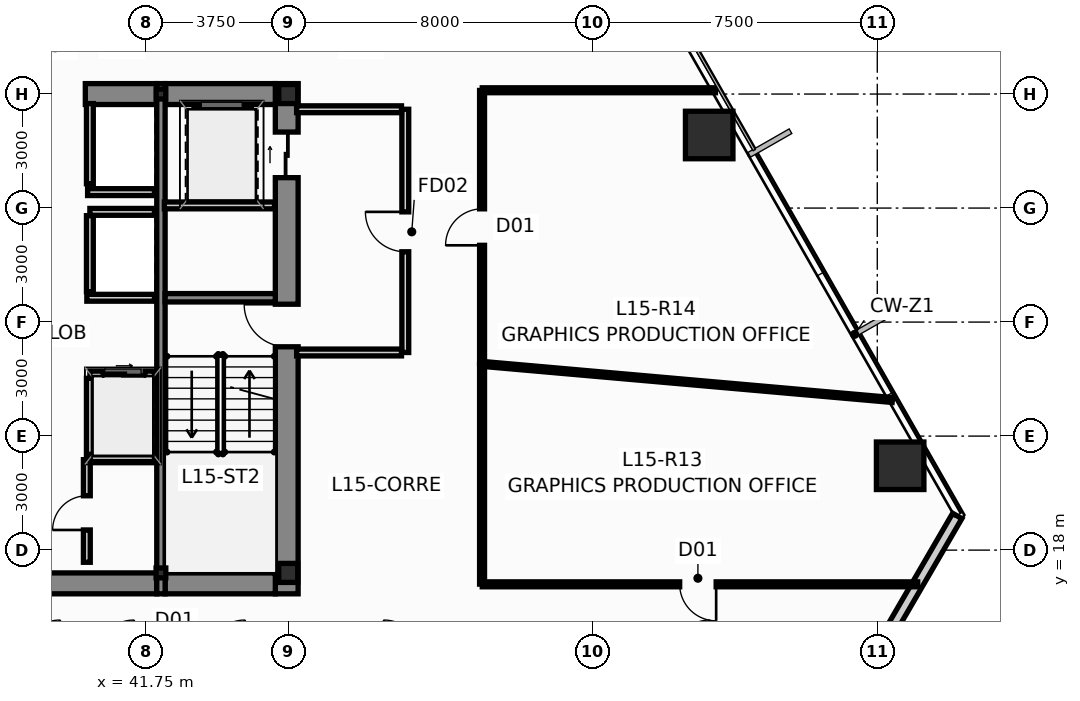
"""IFC4 building model, lengths in metres.
Left out: names, types, materials, properties, quantities, classifications, styles, units other than length and angle.
Written with IfcOpenShell. Run it as: python <this file> out.ifc"""

import sys

from ifc_helpers import new_model, si_unit, direction, frame, frame_2d, origin, origin_2d, place, context, subcontext, project, spatial, rectangle, hollow_rectangle, i_section, extrude, source, transform, mapped, element, fill, save


model = new_model("IFC4")
c1 = context("Model", 3, precision=1e-05, world=origin(), true_north=direction((0.0, 1.0)))
c2 = subcontext(c1, "Body", "Model", "MODEL_VIEW")
j1 = project(units=[si_unit("LENGTHUNIT", "METRE"), si_unit("PLANEANGLEUNIT", "RADIAN")], contexts=[c1])
p1 = place(None, origin())
s1 = spatial("IfcSite", under=j1, at=p1, CompositionType="ELEMENT")
p2 = place(p1, origin())
s2 = spatial("IfcBuilding", under=s1, at=p2, CompositionType="ELEMENT")
p3 = place(p2, frame((0.0, 0.0, 60.45)))
s3 = spatial("IfcBuildingStorey", under=s2, at=p3, CompositionType="ELEMENT", Elevation=60.45)
m1 = source(origin(), c2, "Body", "SweptSolid", [
    extrude(i_section(OverallWidth=0.5, OverallDepth=0.5, WebThickness=0.028, FlangeThickness=0.04, at=origin_2d()), origin(), (0.0, 0.0, 1.0), 3.65),
])
for number, where, z_axis, x_axis in (
    (1, (45.5, 17.4, 0.0), (0.0, 0.0, 1.0), (1.0, 0.0, 0.0)),
    (2, (45.5, 30.0, 0.0), (0.0, 0.0, 1.0), (1.0, 0.0, 0.0)),
):
    element("IfcColumn", number, at=place(p3, frame(where, z_axis=z_axis, x_axis=x_axis)), inside=s3, PredefinedType="COLUMN", context=c2, shape_type="MappedRepresentation", body=[
        mapped(m1, transform((0.0, 0.0, 0.0), scale=1.0)),
    ])
m2 = source(origin(), c2, "Body", "SweptSolid", [
    extrude(i_section(OverallWidth=0.256, OverallDepth=0.26, WebThickness=0.01, FlangeThickness=0.017, at=origin_2d()), origin(), (0.0, 0.0, 1.0), 3.65),
])
for number, where, z_axis, x_axis in (
    (3, (42.15, 17.4, 0.0), (0.0, 0.0, 1.0), (1.0, 0.0, 0.0)),
    (4, (42.15, 30.0, 0.0), (0.0, 0.0, 1.0), (1.0, 0.0, 0.0)),
):
    element("IfcColumn", number, at=place(p3, frame(where, z_axis=z_axis, x_axis=x_axis)), inside=s3, PredefinedType="COLUMN", context=c2, shape_type="MappedRepresentation", body=[
        mapped(m2, transform((0.0, 0.0, 0.0), scale=1.0)),
    ])
p4 = place(p3, frame((45.46, 16.85, 0.0), z_axis=(0.0, 0.0, 1.0), x_axis=(0.0, 1.0, 0.0)))
e5 = element("IfcWall", 5, at=p4, inside=s3, PredefinedType="SHEAR", context=c2, shape_type="SweptSolid", body=[
    extrude(rectangle(XDim=13.425, YDim=0.6, at=frame_2d((6.712, 0.0))), origin(), (0.0, 0.0, 1.0), 3.65),
])
p5 = place(p4, frame((6.5, 0.0, 0.0)))
e6 = element("IfcOpeningElement", 6, at=p5, cuts=e5, PredefinedType="OPENING", context=c2, shape_type="SweptSolid", body=[
    extrude(rectangle(XDim=1.12, YDim=2.15, at=frame_2d((0.56, 1.075))), frame((0.0, 0.312, 0.0), z_axis=(0.0, -1.0, 0.0), x_axis=(1.0, 0.0, 0.0)), (0.0, 0.0, 1.0), 0.624),
])
p6 = place(p4, frame((10.95, 0.0, 0.0)))
e7 = element("IfcOpeningElement", 7, at=p6, cuts=e5, PredefinedType="OPENING", context=c2, shape_type="SweptSolid", body=[
    extrude(rectangle(XDim=1.2, YDim=2.2, at=frame_2d((0.6, 1.1))), frame((0.0, 0.312, 0.0), z_axis=(0.0, -1.0, 0.0), x_axis=(1.0, 0.0, 0.0)), (0.0, 0.0, 1.0), 0.624),
])
p7 = place(p3, frame((33.96, 17.125, 0.0), z_axis=(0.0, 0.0, 1.0), x_axis=(1.0, 0.0, 0.0)))
e8 = element("IfcWall", 8, at=p7, inside=s3, PredefinedType="SHEAR", context=c2, shape_type="SweptSolid", body=[
    extrude(rectangle(XDim=8.08, YDim=0.55, at=frame_2d((4.04, 0.0))), origin(), (0.0, 0.0, 1.0), 3.65),
])
p8 = place(p3, frame((42.26, 17.125, 0.0), z_axis=(0.0, 0.0, 1.0), x_axis=(1.0, 0.0, 0.0)))
e9 = element("IfcWall", 9, at=p8, inside=s3, PredefinedType="SHEAR", context=c2, shape_type="SweptSolid", body=[
    extrude(rectangle(XDim=2.9, YDim=0.55, at=frame_2d((1.45, 0.0))), origin(), (0.0, 0.0, 1.0), 3.65),
])
p9 = place(p3, frame((40.16, 30.0, 0.0), z_axis=(0.0, 0.0, 1.0), x_axis=(1.0, 0.0, 0.0)))
e10 = element("IfcWall", 10, at=p9, inside=s3, PredefinedType="SHEAR", context=c2, shape_type="SweptSolid", body=[
    extrude(rectangle(XDim=1.88, YDim=0.55, at=frame_2d((0.94, 0.0))), origin(), (0.0, 0.0, 1.0), 3.65),
])
p10 = place(p3, frame((42.26, 30.0, 0.0), z_axis=(0.0, 0.0, 1.0), x_axis=(1.0, 0.0, 0.0)))
e11 = element("IfcWall", 11, at=p10, inside=s3, PredefinedType="SHEAR", context=c2, shape_type="SweptSolid", body=[
    extrude(rectangle(XDim=2.9, YDim=0.55, at=frame_2d((1.45, 0.0))), origin(), (0.0, 0.0, 1.0), 3.65),
])
p11 = place(p3, frame((42.15, 16.85, 0.0), z_axis=(0.0, 0.0, 1.0), x_axis=(0.0, 1.0, 0.0)))
e12 = element("IfcWall", 12, at=p11, inside=s3, PredefinedType="SHEAR", context=c2, shape_type="SweptSolid", body=[
    extrude(rectangle(XDim=13.425, YDim=0.22, at=frame_2d((6.712, 0.0))), origin(), (0.0, 0.0, 1.0), 3.65),
])
p12 = place(p3, frame((42.26, 24.64, 0.0), z_axis=(0.0, 0.0, 1.0), x_axis=(1.0, 0.0, 0.0)))
e13 = element("IfcWall", 13, at=p12, inside=s3, PredefinedType="SHEAR", context=c2, shape_type="SweptSolid", body=[
    extrude(rectangle(XDim=2.9, YDim=0.22, at=frame_2d((1.45, 0.0))), origin(), (0.0, 0.0, 1.0), 3.65),
])
m3 = source(origin(), c2, "Body", "SweptSolid", [
    extrude(hollow_rectangle(XDim=1.25, YDim=1.25, WallThickness=0.07, at=origin_2d()), origin(), (0.0, 0.0, 1.0), 3.651),
])
p13 = place(p3, frame((61.602, 20.219, 0.0), z_axis=(-0.010364239282, -0.021530871282, 0.999714461297), x_axis=(0.901042175273, -0.433731481886, 0.0)))
e14 = element("IfcColumn", 14, at=p13, inside=s3, PredefinedType="COLUMN", context=c2, shape_type="MappedRepresentation", body=[
    mapped(m3, transform((0.0, 0.0, 0.0), scale=1.0)),
])
m4 = source(origin(), c2, "Body", "SweptSolid", [
    extrude(hollow_rectangle(XDim=1.25, YDim=1.25, WallThickness=0.07, at=origin_2d()), origin(), (0.0, 0.0, 1.0), 3.651),
])
p14 = place(p3, frame((56.577, 28.923, 0.0), z_axis=(-0.014912316331, -0.013775502979, 0.999793907933), x_axis=(0.678553674548, -0.734550822447, 0.0)))
e15 = element("IfcColumn", 15, at=p14, inside=s3, PredefinedType="COLUMN", context=c2, shape_type="MappedRepresentation", body=[
    mapped(m4, transform((0.0, 0.0, 0.0), scale=1.0)),
])
p15 = place(p3, frame((63.104, 18.899, 0.0), z_axis=(0.0, 0.0, 1.0), x_axis=(-0.502893983591, -0.864348101906, 0.0)))
e16 = element("IfcWall", 16, at=p15, inside=s3, PredefinedType="STANDARD", context=c2, shape_type="SweptSolid", body=[
    extrude(rectangle(XDim=16.365, YDim=0.28, at=frame_2d((8.183, 0.0))), origin(), (0.0, 0.0, 1.0), 3.4),
])
p16 = place(p15, frame((7.28, 0.0, 0.9)))
e17 = element("IfcOpeningElement", 17, at=p16, cuts=e16, PredefinedType="OPENING", context=c2, shape_type="SweptSolid", body=[
    extrude(rectangle(XDim=1.8, YDim=1.8, at=frame_2d((0.9, 0.9))), frame((0.0, 0.152, 0.0), z_axis=(0.0, -1.0, 0.0), x_axis=(1.0, 0.0, 0.0)), (0.0, 0.0, 1.0), 0.304),
])
p17 = place(p3, frame((40.28, 22.62, 0.0), z_axis=(0.0, 0.0, 1.0), x_axis=(1.0, 0.0, 0.0)))
e18 = element("IfcWall", 18, at=p17, inside=s3, PredefinedType="PARTITIONING", context=c2, shape_type="SweptSolid", body=[
    extrude(rectangle(XDim=1.7, YDim=0.18, at=frame_2d((0.85, 0.0))), origin(), (0.0, 0.0, 1.0), 3.4),
])
p18 = place(p17, frame((0.35, 0.0, 0.0)))
e19 = element("IfcOpeningElement", 19, at=p18, cuts=e18, PredefinedType="OPENING", context=c2, shape_type="SweptSolid", body=[
    extrude(rectangle(XDim=1.1, YDim=2.2, at=frame_2d((0.55, 1.1))), frame((0.0, 0.102, 0.0), z_axis=(0.0, -1.0, 0.0), x_axis=(1.0, 0.0, 0.0)), (0.0, 0.0, 1.0), 0.204),
])
p19 = place(p3, frame((40.28, 20.52, 0.0), z_axis=(0.0, 0.0, 1.0), x_axis=(0.0, 1.0, 0.0)))
e20 = element("IfcWall", 20, at=p19, inside=s3, PredefinedType="PARTITIONING", context=c2, shape_type="SweptSolid", body=[
    extrude(rectangle(XDim=2.0, YDim=0.18, at=frame_2d((1.0, 0.0))), origin(), (0.0, 0.0, 1.0), 3.4),
])
p20 = place(p3, frame((40.28, 26.9, 0.0), z_axis=(0.0, 0.0, 1.0), x_axis=(1.0, 0.0, 0.0)))
e21 = element("IfcWall", 21, at=p20, inside=s3, PredefinedType="PARTITIONING", context=c2, shape_type="SweptSolid", body=[
    extrude(rectangle(XDim=1.7, YDim=0.18, at=frame_2d((0.85, 0.0))), origin(), (0.0, 0.0, 1.0), 3.4),
])
p21 = place(p3, frame((40.28, 24.8, 0.0), z_axis=(0.0, 0.0, 1.0), x_axis=(0.0, 1.0, 0.0)))
e22 = element("IfcWall", 22, at=p21, inside=s3, PredefinedType="PARTITIONING", context=c2, shape_type="SweptSolid", body=[
    extrude(rectangle(XDim=2.0, YDim=0.18, at=frame_2d((1.0, 0.0))), origin(), (0.0, 0.0, 1.0), 3.4),
])
p22 = place(p3, frame((40.2, 24.64, 0.0), z_axis=(0.0, 0.0, 1.0), x_axis=(1.0, 0.0, 0.0)))
e23 = element("IfcWall", 23, at=p22, inside=s3, PredefinedType="PARTITIONING", context=c2, shape_type="SweptSolid", body=[
    extrude(rectangle(XDim=1.78, YDim=0.18, at=frame_2d((0.89, 0.0))), origin(), (0.0, 0.0, 1.0), 3.4),
])
p23 = place(p3, frame((40.22, 27.42, 0.0), z_axis=(0.0, 0.0, 1.0), x_axis=(1.0, 0.0, 0.0)))
e24 = element("IfcWall", 24, at=p23, inside=s3, PredefinedType="PARTITIONING", context=c2, shape_type="SweptSolid", body=[
    extrude(rectangle(XDim=1.76, YDim=0.18, at=frame_2d((0.88, 0.0))), origin(), (0.0, 0.0, 1.0), 3.4),
])
p24 = place(p3, frame((40.28, 27.64, 0.0), z_axis=(0.0, 0.0, 1.0), x_axis=(0.0, 1.0, 0.0)))
e25 = element("IfcWall", 25, at=p24, inside=s3, PredefinedType="PARTITIONING", context=c2, shape_type="SweptSolid", body=[
    extrude(rectangle(XDim=2.11, YDim=0.18, at=frame_2d((1.055, 0.0))), origin(), (0.0, 0.0, 1.0), 3.4),
])
p25 = place(p3, frame((48.58, 23.2, 0.0), z_axis=(0.0, 0.0, 1.0), x_axis=(0.0, 1.0, 0.0)))
e26 = element("IfcWall", 26, at=p25, inside=s3, PredefinedType="PARTITIONING", context=c2, shape_type="SweptSolid", body=[
    extrude(rectangle(XDim=6.4, YDim=0.18, at=frame_2d((3.2, 0.0))), origin(), (0.0, 0.0, 1.0), 3.026),
])
p26 = place(p25, frame((2.65, 0.0, 0.0)))
e27 = element("IfcOpeningElement", 27, at=p26, cuts=e26, PredefinedType="OPENING", context=c2, shape_type="SweptSolid", body=[
    extrude(rectangle(XDim=1.05, YDim=2.15, at=frame_2d((0.525, 1.075))), frame((0.0, 0.102, 0.0), z_axis=(0.0, -1.0, 0.0), x_axis=(1.0, 0.0, 0.0)), (0.0, 0.0, 1.0), 0.204),
])
p27 = place(p3, frame((45.72, 23.2, 0.0), z_axis=(0.0, 0.0, 1.0), x_axis=(1.0, 0.0, 0.0)))
e28 = element("IfcWall", 28, at=p27, inside=s3, PredefinedType="PARTITIONING", context=c2, shape_type="SweptSolid", body=[
    extrude(rectangle(XDim=2.76, YDim=0.18, at=frame_2d((1.38, 0.0))), origin(), (0.0, 0.0, 1.0), 3.4),
])
p28 = place(p3, frame((45.72, 29.6, 0.0), z_axis=(0.0, 0.0, 1.0), x_axis=(1.0, 0.0, 0.0)))
e29 = element("IfcWall", 29, at=p28, inside=s3, PredefinedType="PARTITIONING", context=c2, shape_type="SweptSolid", body=[
    extrude(rectangle(XDim=2.76, YDim=0.18, at=frame_2d((1.38, 0.0))), origin(), (0.0, 0.0, 1.0), 2.783),
])
p29 = place(p3, frame((42.24, 27.07, 0.0), z_axis=(0.0, 0.0, 1.0), x_axis=(1.0, 0.0, 0.0)))
e30 = element("IfcWall", 30, at=p29, inside=s3, PredefinedType="PARTITIONING", context=c2, shape_type="SweptSolid", body=[
    extrude(rectangle(XDim=2.9, YDim=0.18, at=frame_2d((1.45, 0.0))), origin(), (0.0, 0.0, 1.0), 3.4),
])
p30 = place(p3, frame((40.22, 20.42, 0.0), z_axis=(0.0, 0.0, 1.0), x_axis=(1.0, 0.0, 0.0)))
e31 = element("IfcWall", 31, at=p30, inside=s3, PredefinedType="PARTITIONING", context=c2, shape_type="SweptSolid", body=[
    extrude(rectangle(XDim=1.76, YDim=0.18, at=frame_2d((0.88, 0.0))), origin(), (0.0, 0.0, 1.0), 3.4),
])
p31 = place(p3, frame((40.2, 17.68, 0.0), z_axis=(0.0, 0.0, 1.0), x_axis=(0.0, 1.0, 0.0)))
e32 = element("IfcWall", 32, at=p31, inside=s3, PredefinedType="PARTITIONING", context=c2, shape_type="SweptSolid", body=[
    extrude(rectangle(XDim=2.7, YDim=0.18, at=frame_2d((1.35, 0.0))), origin(), (0.0, 0.0, 1.0), 3.4),
])
p32 = place(p31, frame((0.85, 0.0, 0.0)))
e33 = element("IfcOpeningElement", 33, at=p32, cuts=e32, PredefinedType="OPENING", context=c2, shape_type="SweptSolid", body=[
    extrude(rectangle(XDim=0.9, YDim=2.1, at=frame_2d((0.45, 1.05))), frame((0.0, 0.102, 0.0), z_axis=(0.0, -1.0, 0.0), x_axis=(1.0, 0.0, 0.0)), (0.0, 0.0, 1.0), 0.204),
])
p33 = place(p3, frame((62.063, 17.1, 0.0), z_axis=(0.0, 0.0, 1.0), x_axis=(-1.0, 0.0, 0.0)))
e34 = element("IfcWall", 34, at=p33, inside=s3, PredefinedType="PARTITIONING", context=c2, shape_type="SweptSolid", body=[
    extrude(rectangle(XDim=11.458, YDim=0.13, at=frame_2d((5.729, 0.0))), origin(), (0.0, 0.0, 1.0), 3.4),
])
p34 = place(p33, frame((5.303, 0.0, 0.0)))
e35 = element("IfcOpeningElement", 35, at=p34, cuts=e34, PredefinedType="OPENING", context=c2, shape_type="SweptSolid", body=[
    extrude(rectangle(XDim=0.96, YDim=2.15, at=frame_2d((0.48, 1.075))), frame((0.0, 0.077, 0.0), z_axis=(0.0, -1.0, 0.0), x_axis=(1.0, 0.0, 0.0)), (0.0, 0.0, 1.0), 0.154),
])
p35 = place(p3, frame((50.605, 22.9, 0.0), z_axis=(0.0, 0.0, 1.0), x_axis=(0.996147935278, -0.087688602691, 0.0)))
e36 = element("IfcWall", 36, at=p35, inside=s3, PredefinedType="PARTITIONING", context=c2, shape_type="SweptSolid", body=[
    extrude(rectangle(XDim=10.833, YDim=0.13, at=frame_2d((5.417, 0.0))), origin(), (0.0, 0.0, 1.0), 3.4),
])
p36 = place(p3, frame((50.6, 22.905, 0.0), z_axis=(0.0, 0.0, 1.0), x_axis=(0.0, 1.0, 0.0)))
e37 = element("IfcWall", 37, at=p36, inside=s3, PredefinedType="PARTITIONING", context=c2, shape_type="SweptSolid", body=[
    extrude(rectangle(XDim=7.19, YDim=0.13, at=frame_2d((3.595, 0.0))), origin(), (0.0, 0.0, 1.0), 3.026),
])
p37 = place(p36, frame((3.115, 0.0, 0.0)))
e38 = element("IfcOpeningElement", 38, at=p37, cuts=e37, PredefinedType="OPENING", context=c2, shape_type="SweptSolid", body=[
    extrude(rectangle(XDim=0.96, YDim=2.15, at=frame_2d((0.48, 1.075))), frame((0.0, 0.077, 0.0), z_axis=(0.0, -1.0, 0.0), x_axis=(1.0, 0.0, 0.0)), (0.0, 0.0, 1.0), 0.154),
])
p38 = place(p3, frame((50.605, 30.1, 0.0), z_axis=(0.0, 0.0, 1.0), x_axis=(1.0, 0.0, 0.0)))
e39 = element("IfcWall", 39, at=p38, inside=s3, PredefinedType="PARTITIONING", context=c2, shape_type="SweptSolid", body=[
    extrude(rectangle(XDim=6.136, YDim=0.13, at=frame_2d((3.068, 0.0))), origin(), (0.0, 0.0, 1.0), 3.4),
])
p39 = place(p3, frame((50.6, 17.105, 0.0), z_axis=(0.0, 0.0, 1.0), x_axis=(0.0, 1.0, 0.0)))
e40 = element("IfcWall", 40, at=p39, inside=s3, PredefinedType="PARTITIONING", context=c2, shape_type="SweptSolid", body=[
    extrude(rectangle(XDim=5.79, YDim=0.13, at=frame_2d((2.895, 0.0))), origin(), (0.0, 0.0, 1.0), 3.4),
])
p40 = place(p5, origin())
e41 = element("IfcDoor", 41, at=p40, inside=s3, OperationType="SINGLE_SWING_RIGHT", PredefinedType="DOOR", context=c2, shape_type="SweptSolid", body=[
    extrude(rectangle(XDim=1.12, YDim=2.15, at=frame_2d((0.56, 1.075))), frame((0.0, 0.025, 0.0), z_axis=(0.0, -1.0, 0.0), x_axis=(1.0, 0.0, 0.0)), (0.0, 0.0, 1.0), 0.05),
])
fill(e6, e41)
p41 = place(p6, origin())
e42 = element("IfcDoor", 42, at=p41, inside=s3, OperationType="SLIDING_TO_RIGHT", PredefinedType="DOOR", context=c2, shape_type="SweptSolid", body=[
    extrude(rectangle(XDim=1.2, YDim=2.2, at=frame_2d((0.6, 1.1))), frame((0.0, 0.025, 0.0), z_axis=(0.0, -1.0, 0.0), x_axis=(1.0, 0.0, 0.0)), (0.0, 0.0, 1.0), 0.05),
])
fill(e7, e42)
p42 = place(p18, origin())
e43 = element("IfcDoor", 43, at=p42, inside=s3, OperationType="SLIDING_TO_LEFT", PredefinedType="DOOR", context=c2, shape_type="SweptSolid", body=[
    extrude(rectangle(XDim=1.1, YDim=2.2, at=frame_2d((0.55, 1.1))), frame((0.0, 0.025, 0.0), z_axis=(0.0, -1.0, 0.0), x_axis=(1.0, 0.0, 0.0)), (0.0, 0.0, 1.0), 0.05),
])
fill(e19, e43)
p43 = place(p26, origin())
e44 = element("IfcDoor", 44, at=p43, inside=s3, OperationType="SINGLE_SWING_RIGHT", PredefinedType="DOOR", context=c2, shape_type="SweptSolid", body=[
    extrude(rectangle(XDim=1.05, YDim=2.15, at=frame_2d((0.525, 1.075))), frame((0.0, 0.025, 0.0), z_axis=(0.0, -1.0, 0.0), x_axis=(1.0, 0.0, 0.0)), (0.0, 0.0, 1.0), 0.05),
])
fill(e27, e44)
p44 = place(p32, origin())
e45 = element("IfcDoor", 45, at=p44, inside=s3, OperationType="SINGLE_SWING_LEFT", PredefinedType="DOOR", context=c2, shape_type="SweptSolid", body=[
    extrude(rectangle(XDim=0.9, YDim=2.1, at=frame_2d((0.45, 1.05))), frame((0.0, 0.025, 0.0), z_axis=(0.0, -1.0, 0.0), x_axis=(1.0, 0.0, 0.0)), (0.0, 0.0, 1.0), 0.05),
])
fill(e33, e45)
p45 = place(p34, origin())
e46 = element("IfcDoor", 46, at=p45, inside=s3, OperationType="SINGLE_SWING_LEFT", PredefinedType="DOOR", context=c2, shape_type="SweptSolid", body=[
    extrude(rectangle(XDim=0.96, YDim=2.15, at=frame_2d((0.48, 1.075))), frame((0.0, 0.025, 0.0), z_axis=(0.0, -1.0, 0.0), x_axis=(1.0, 0.0, 0.0)), (0.0, 0.0, 1.0), 0.05),
])
fill(e35, e46)
p46 = place(p37, origin())
e47 = element("IfcDoor", 47, at=p46, inside=s3, OperationType="SINGLE_SWING_LEFT", PredefinedType="DOOR", context=c2, shape_type="SweptSolid", body=[
    extrude(rectangle(XDim=0.96, YDim=2.15, at=frame_2d((0.48, 1.075))), frame((0.0, 0.025, 0.0), z_axis=(0.0, -1.0, 0.0), x_axis=(1.0, 0.0, 0.0)), (0.0, 0.0, 1.0), 0.05),
])
fill(e38, e47)
save(model, sys.argv[1])
